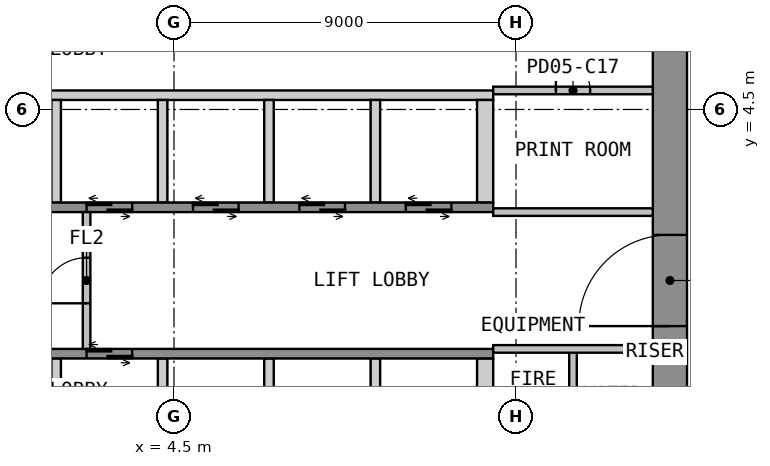
"""IFC4 building model, lengths in metres.
Left out: names, types, materials, properties, quantities, classifications, styles, units other than length and angle.
Written with IfcOpenShell. Run it as: python <this file> out.ifc"""

import sys

from ifc_helpers import new_model, si_unit, direction, frame, frame_2d, origin, place, context, subcontext, project, spatial, polyline, rectangle, outline, extrude, element, fill, save


model = new_model("IFC4")
c1 = context("Model", 3, precision=1e-05, world=origin(), true_north=direction((0.0, 1.0)))
c2 = subcontext(c1, "Body", "Model", "MODEL_VIEW")
j1 = project(units=[si_unit("LENGTHUNIT", "METRE"), si_unit("PLANEANGLEUNIT", "RADIAN")], contexts=[c1])
p1 = place(None, origin())
s1 = spatial("IfcSite", under=j1, at=p1, CompositionType="ELEMENT")
p2 = place(p1, origin())
s2 = spatial("IfcBuilding", under=s1, at=p2, CompositionType="ELEMENT")
p3 = place(p2, frame((0.0, 0.0, 25.2)))
s3 = spatial("IfcBuildingStorey", under=s2, at=p3, CompositionType="ELEMENT", Elevation=25.2)
p4 = place(p3, frame((17.55, -12.6, 0.0), z_axis=(0.0, 0.0, 1.0), x_axis=(0.0, 1.0, 0.0)))
e1 = element("IfcWall", 1, at=p4, inside=s3, PredefinedType="SHEAR", context=c2, shape_type="SweptSolid", body=[
    extrude(rectangle(XDim=25.2, YDim=0.9, at=frame_2d((12.6, 0.0))), origin(), (0.0, 0.0, 1.0), 4.425),
])
p5 = place(p4, frame((11.4, 0.0, 0.0)))
e2 = element("IfcOpeningElement", 2, at=p5, cuts=e1, PredefinedType="OPENING", context=c2, shape_type="SweptSolid", body=[
    extrude(rectangle(XDim=2.4, YDim=2.1, at=frame_2d((1.2, 1.05))), frame((0.0, 0.46, 0.0), z_axis=(0.0, -1.0, 0.0), x_axis=(1.0, 0.0, 0.0)), (0.0, 0.0, 1.0), 0.92),
])
p6 = place(p3, origin())
e3 = element("IfcWall", 3, at=p6, inside=s3, PredefinedType="SHEAR", context=c2, shape_type="SweptSolid", body=[
    extrude(outline(polyline([(-12.9, 4.75), (12.9, 4.75), (12.9, 5.0), (-12.9, 5.0), (-12.9, 4.75)])), origin(), (0.0, 0.0, 1.0), 4.425),
])
p7 = place(p3, origin())
e4 = element("IfcWall", 4, at=p7, inside=s3, PredefinedType="SHEAR", context=c2, shape_type="SweptSolid", body=[
    extrude(outline(polyline([(1.275, 2.05), (1.525, 2.05), (1.525, 4.75), (1.275, 4.75), (1.275, 2.05)])), origin(), (0.0, 0.0, 1.0), 4.425),
])
p8 = place(p3, origin())
e5 = element("IfcWall", 5, at=p8, inside=s3, PredefinedType="SHEAR", context=c2, shape_type="SweptSolid", body=[
    extrude(outline(polyline([(4.075, 2.05), (4.325, 2.05), (4.325, 4.75), (4.075, 4.75), (4.075, 2.05)])), origin(), (0.0, 0.0, 1.0), 4.425),
])
p9 = place(p3, origin())
e6 = element("IfcWall", 6, at=p9, inside=s3, PredefinedType="SHEAR", context=c2, shape_type="SweptSolid", body=[
    extrude(outline(polyline([(6.875, 2.05), (7.125, 2.05), (7.125, 4.75), (6.875, 4.75), (6.875, 2.05)])), origin(), (0.0, 0.0, 1.0), 4.425),
])
p10 = place(p3, origin())
e7 = element("IfcWall", 7, at=p10, inside=s3, PredefinedType="SHEAR", context=c2, shape_type="SweptSolid", body=[
    extrude(outline(polyline([(9.675, 2.05), (9.925, 2.05), (9.925, 4.75), (9.675, 4.75), (9.675, 2.05)])), origin(), (0.0, 0.0, 1.0), 4.425),
])
p11 = place(p3, origin())
e8 = element("IfcWall", 8, at=p11, inside=s3, PredefinedType="SHEAR", context=c2, shape_type="SweptSolid", body=[
    extrude(outline(polyline([(12.475, 2.05), (12.9, 2.05), (12.9, 4.75), (12.475, 4.75), (12.475, 2.05)])), origin(), (0.0, 0.0, 1.0), 4.425),
])
p12 = place(p3, frame((-12.9, 1.925, 0.0), z_axis=(0.0, 0.0, 1.0), x_axis=(1.0, 0.0, 0.0)))
e9 = element("IfcWall", 9, at=p12, inside=s3, PredefinedType="SHEAR", context=c2, shape_type="SweptSolid", body=[
    extrude(rectangle(XDim=25.8, YDim=0.25, at=frame_2d((12.9, 0.0))), origin(), (0.0, 0.0, 1.0), 4.425),
])
p13 = place(p12, frame((9.5, 0.0, 0.0)))
e10 = element("IfcOpeningElement", 10, at=p13, cuts=e9, PredefinedType="OPENING", context=c2, shape_type="SweptSolid", body=[
    extrude(rectangle(XDim=1.2, YDim=2.1, at=frame_2d((0.6, 1.05))), frame((0.0, 0.135, 0.0), z_axis=(0.0, -1.0, 0.0), x_axis=(1.0, 0.0, 0.0)), (0.0, 0.0, 1.0), 0.27),
])
p14 = place(p12, frame((12.3, 0.0, 0.0)))
e11 = element("IfcOpeningElement", 11, at=p14, cuts=e9, PredefinedType="OPENING", context=c2, shape_type="SweptSolid", body=[
    extrude(rectangle(XDim=1.2, YDim=2.1, at=frame_2d((0.6, 1.05))), frame((0.0, 0.135, 0.0), z_axis=(0.0, -1.0, 0.0), x_axis=(1.0, 0.0, 0.0)), (0.0, 0.0, 1.0), 0.27),
])
p15 = place(p12, frame((15.1, 0.0, 0.0)))
e12 = element("IfcOpeningElement", 12, at=p15, cuts=e9, PredefinedType="OPENING", context=c2, shape_type="SweptSolid", body=[
    extrude(rectangle(XDim=1.2, YDim=2.1, at=frame_2d((0.6, 1.05))), frame((0.0, 0.135, 0.0), z_axis=(0.0, -1.0, 0.0), x_axis=(1.0, 0.0, 0.0)), (0.0, 0.0, 1.0), 0.27),
])
p16 = place(p12, frame((17.9, 0.0, 0.0)))
e13 = element("IfcOpeningElement", 13, at=p16, cuts=e9, PredefinedType="OPENING", context=c2, shape_type="SweptSolid", body=[
    extrude(rectangle(XDim=1.2, YDim=2.1, at=frame_2d((0.6, 1.05))), frame((0.0, 0.135, 0.0), z_axis=(0.0, -1.0, 0.0), x_axis=(1.0, 0.0, 0.0)), (0.0, 0.0, 1.0), 0.27),
])
p17 = place(p12, frame((20.7, 0.0, 0.0)))
e14 = element("IfcOpeningElement", 14, at=p17, cuts=e9, PredefinedType="OPENING", context=c2, shape_type="SweptSolid", body=[
    extrude(rectangle(XDim=1.2, YDim=2.1, at=frame_2d((0.6, 1.05))), frame((0.0, 0.135, 0.0), z_axis=(0.0, -1.0, 0.0), x_axis=(1.0, 0.0, 0.0)), (0.0, 0.0, 1.0), 0.27),
])
p18 = place(p12, frame((23.5, 0.0, 0.0)))
e15 = element("IfcOpeningElement", 15, at=p18, cuts=e9, PredefinedType="OPENING", context=c2, shape_type="SweptSolid", body=[
    extrude(rectangle(XDim=1.2, YDim=2.1, at=frame_2d((0.6, 1.05))), frame((0.0, 0.135, 0.0), z_axis=(0.0, -1.0, 0.0), x_axis=(1.0, 0.0, 0.0)), (0.0, 0.0, 1.0), 0.27),
])
p19 = place(p3, origin())
e16 = element("IfcWall", 16, at=p19, inside=s3, PredefinedType="SHEAR", context=c2, shape_type="SweptSolid", body=[
    extrude(outline(polyline([(1.275, -4.75), (1.525, -4.75), (1.525, -2.05), (1.275, -2.05), (1.275, -4.75)])), origin(), (0.0, 0.0, 1.0), 4.425),
])
p20 = place(p3, origin())
e17 = element("IfcWall", 17, at=p20, inside=s3, PredefinedType="SHEAR", context=c2, shape_type="SweptSolid", body=[
    extrude(outline(polyline([(4.075, -4.75), (4.325, -4.75), (4.325, -2.05), (4.075, -2.05), (4.075, -4.75)])), origin(), (0.0, 0.0, 1.0), 4.425),
])
p21 = place(p3, origin())
e18 = element("IfcWall", 18, at=p21, inside=s3, PredefinedType="SHEAR", context=c2, shape_type="SweptSolid", body=[
    extrude(outline(polyline([(6.875, -4.75), (7.125, -4.75), (7.125, -2.05), (6.875, -2.05), (6.875, -4.75)])), origin(), (0.0, 0.0, 1.0), 4.425),
])
p22 = place(p3, origin())
e19 = element("IfcWall", 19, at=p22, inside=s3, PredefinedType="SHEAR", context=c2, shape_type="SweptSolid", body=[
    extrude(outline(polyline([(9.675, -4.75), (9.925, -4.75), (9.925, -2.05), (9.675, -2.05), (9.675, -4.75)])), origin(), (0.0, 0.0, 1.0), 4.425),
])
p23 = place(p3, origin())
e20 = element("IfcWall", 20, at=p23, inside=s3, PredefinedType="SHEAR", context=c2, shape_type="SweptSolid", body=[
    extrude(outline(polyline([(12.475, -4.75), (12.9, -4.75), (12.9, -2.05), (12.475, -2.05), (12.475, -4.75)])), origin(), (0.0, 0.0, 1.0), 4.425),
])
p24 = place(p3, frame((-12.9, -1.925, 0.0), z_axis=(0.0, 0.0, 1.0), x_axis=(1.0, 0.0, 0.0)))
e21 = element("IfcWall", 21, at=p24, inside=s3, PredefinedType="SHEAR", context=c2, shape_type="SweptSolid", body=[
    extrude(rectangle(XDim=25.8, YDim=0.25, at=frame_2d((12.9, 0.0))), origin(), (0.0, 0.0, 1.0), 4.425),
])
p25 = place(p24, frame((1.1, 0.0, 0.0)))
e22 = element("IfcOpeningElement", 22, at=p25, cuts=e21, PredefinedType="OPENING", context=c2, shape_type="SweptSolid", body=[
    extrude(rectangle(XDim=1.2, YDim=2.1, at=frame_2d((0.6, 1.05))), frame((0.0, 0.135, 0.0), z_axis=(0.0, -1.0, 0.0), x_axis=(1.0, 0.0, 0.0)), (0.0, 0.0, 1.0), 0.27),
])
p26 = place(p24, frame((3.9, 0.0, 0.0)))
e23 = element("IfcOpeningElement", 23, at=p26, cuts=e21, PredefinedType="OPENING", context=c2, shape_type="SweptSolid", body=[
    extrude(rectangle(XDim=1.2, YDim=2.1, at=frame_2d((0.6, 1.05))), frame((0.0, 0.135, 0.0), z_axis=(0.0, -1.0, 0.0), x_axis=(1.0, 0.0, 0.0)), (0.0, 0.0, 1.0), 0.27),
])
p27 = place(p24, frame((6.7, 0.0, 0.0)))
e24 = element("IfcOpeningElement", 24, at=p27, cuts=e21, PredefinedType="OPENING", context=c2, shape_type="SweptSolid", body=[
    extrude(rectangle(XDim=1.2, YDim=2.1, at=frame_2d((0.6, 1.05))), frame((0.0, 0.135, 0.0), z_axis=(0.0, -1.0, 0.0), x_axis=(1.0, 0.0, 0.0)), (0.0, 0.0, 1.0), 0.27),
])
p28 = place(p24, frame((9.5, 0.0, 0.0)))
e25 = element("IfcOpeningElement", 25, at=p28, cuts=e21, PredefinedType="OPENING", context=c2, shape_type="SweptSolid", body=[
    extrude(rectangle(XDim=1.2, YDim=2.1, at=frame_2d((0.6, 1.05))), frame((0.0, 0.135, 0.0), z_axis=(0.0, -1.0, 0.0), x_axis=(1.0, 0.0, 0.0)), (0.0, 0.0, 1.0), 0.27),
])
p29 = place(p24, frame((12.3, 0.0, 0.0)))
e26 = element("IfcOpeningElement", 26, at=p29, cuts=e21, PredefinedType="OPENING", context=c2, shape_type="SweptSolid", body=[
    extrude(rectangle(XDim=1.2, YDim=2.1, at=frame_2d((0.6, 1.05))), frame((0.0, 0.135, 0.0), z_axis=(0.0, -1.0, 0.0), x_axis=(1.0, 0.0, 0.0)), (0.0, 0.0, 1.0), 0.27),
])
p30 = place(p24, frame((15.1, 0.0, 0.0)))
e27 = element("IfcOpeningElement", 27, at=p30, cuts=e21, PredefinedType="OPENING", context=c2, shape_type="SweptSolid", body=[
    extrude(rectangle(XDim=1.2, YDim=2.1, at=frame_2d((0.6, 1.05))), frame((0.0, 0.135, 0.0), z_axis=(0.0, -1.0, 0.0), x_axis=(1.0, 0.0, 0.0)), (0.0, 0.0, 1.0), 0.27),
])
p31 = place(p3, frame((2.2, -1.8, 0.0), z_axis=(0.0, 0.0, 1.0), x_axis=(0.0, 1.0, 0.0)))
e28 = element("IfcWall", 28, at=p31, inside=s3, PredefinedType="PARTITIONING", context=c2, shape_type="SweptSolid", body=[
    extrude(rectangle(XDim=3.6, YDim=0.2, at=frame_2d((1.8, 0.0))), origin(), (0.0, 0.0, 1.0), 4.425),
])
p32 = place(p31, frame((1.2, 0.0, 0.0)))
e29 = element("IfcOpeningElement", 29, at=p32, cuts=e28, PredefinedType="OPENING", context=c2, shape_type="SweptSolid", body=[
    extrude(rectangle(XDim=1.2, YDim=2.1, at=frame_2d((0.6, 1.05))), frame((0.0, 0.11, 0.0), z_axis=(0.0, -1.0, 0.0), x_axis=(1.0, 0.0, 0.0)), (0.0, 0.0, 1.0), 0.22),
])
p33 = place(p3, frame((12.9, 5.0, 0.0), z_axis=(0.0, 0.0, 1.0), x_axis=(1.0, 0.0, 0.0)))
e30 = element("IfcWall", 30, at=p33, inside=s3, PredefinedType="PARTITIONING", context=c2, shape_type="SweptSolid", body=[
    extrude(rectangle(XDim=4.2, YDim=0.2, at=frame_2d((2.1, 0.0))), origin(), (0.0, 0.0, 1.0), 4.425),
])
p34 = place(p33, frame((1.65, 0.0, 0.0)))
e31 = element("IfcOpeningElement", 31, at=p34, cuts=e30, PredefinedType="OPENING", context=c2, shape_type="SweptSolid", body=[
    extrude(rectangle(XDim=0.9, YDim=2.1, at=frame_2d((0.45, 1.05))), frame((0.0, 0.11, 0.0), z_axis=(0.0, -1.0, 0.0), x_axis=(1.0, 0.0, 0.0)), (0.0, 0.0, 1.0), 0.22),
])
p35 = place(p3, frame((12.9, 1.8, 0.0), z_axis=(0.0, 0.0, 1.0), x_axis=(1.0, 0.0, 0.0)))
e32 = element("IfcWall", 32, at=p35, inside=s3, PredefinedType="PARTITIONING", context=c2, shape_type="SweptSolid", body=[
    extrude(rectangle(XDim=4.2, YDim=0.2, at=frame_2d((2.1, 0.0))), origin(), (0.0, 0.0, 1.0), 4.425),
])
p36 = place(p3, frame((15.0, -5.0, 0.0), z_axis=(0.0, 0.0, 1.0), x_axis=(0.0, 1.0, 0.0)))
e33 = element("IfcWall", 33, at=p36, inside=s3, PredefinedType="PARTITIONING", context=c2, shape_type="SweptSolid", body=[
    extrude(rectangle(XDim=3.2, YDim=0.2, at=frame_2d((1.6, 0.0))), origin(), (0.0, 0.0, 1.0), 4.425),
])
p37 = place(p3, frame((12.9, -1.8, 0.0), z_axis=(0.0, 0.0, 1.0), x_axis=(1.0, 0.0, 0.0)))
e34 = element("IfcWall", 34, at=p37, inside=s3, PredefinedType="PARTITIONING", context=c2, shape_type="SweptSolid", body=[
    extrude(rectangle(XDim=4.2, YDim=0.2, at=frame_2d((2.1, 0.0))), origin(), (0.0, 0.0, 1.0), 4.425),
])
p38 = place(p5, origin())
e35 = element("IfcDoor", 35, at=p38, inside=s3, OperationType="DOUBLE_DOOR_DOUBLE_SWING", PredefinedType="DOOR", context=c2, shape_type="SweptSolid", body=[
    extrude(rectangle(XDim=2.4, YDim=2.1, at=frame_2d((1.2, 1.05))), frame((0.0, 0.025, 0.0), z_axis=(0.0, -1.0, 0.0), x_axis=(1.0, 0.0, 0.0)), (0.0, 0.0, 1.0), 0.05),
])
fill(e2, e35)
p39 = place(p15, origin())
e36 = element("IfcDoor", 36, at=p39, inside=s3, OperationType="DOUBLE_DOOR_SLIDING", PredefinedType="DOOR", context=c2, shape_type="SweptSolid", body=[
    extrude(rectangle(XDim=1.2, YDim=2.1, at=frame_2d((0.6, 1.05))), frame((0.0, 0.025, 0.0), z_axis=(0.0, -1.0, 0.0), x_axis=(1.0, 0.0, 0.0)), (0.0, 0.0, 1.0), 0.05),
])
fill(e12, e36)
p40 = place(p16, origin())
e37 = element("IfcDoor", 37, at=p40, inside=s3, OperationType="DOUBLE_DOOR_SLIDING", PredefinedType="DOOR", context=c2, shape_type="SweptSolid", body=[
    extrude(rectangle(XDim=1.2, YDim=2.1, at=frame_2d((0.6, 1.05))), frame((0.0, 0.025, 0.0), z_axis=(0.0, -1.0, 0.0), x_axis=(1.0, 0.0, 0.0)), (0.0, 0.0, 1.0), 0.05),
])
fill(e13, e37)
p41 = place(p17, origin())
e38 = element("IfcDoor", 38, at=p41, inside=s3, OperationType="DOUBLE_DOOR_SLIDING", PredefinedType="DOOR", context=c2, shape_type="SweptSolid", body=[
    extrude(rectangle(XDim=1.2, YDim=2.1, at=frame_2d((0.6, 1.05))), frame((0.0, 0.025, 0.0), z_axis=(0.0, -1.0, 0.0), x_axis=(1.0, 0.0, 0.0)), (0.0, 0.0, 1.0), 0.05),
])
fill(e14, e38)
p42 = place(p18, origin())
e39 = element("IfcDoor", 39, at=p42, inside=s3, OperationType="DOUBLE_DOOR_SLIDING", PredefinedType="DOOR", context=c2, shape_type="SweptSolid", body=[
    extrude(rectangle(XDim=1.2, YDim=2.1, at=frame_2d((0.6, 1.05))), frame((0.0, 0.025, 0.0), z_axis=(0.0, -1.0, 0.0), x_axis=(1.0, 0.0, 0.0)), (0.0, 0.0, 1.0), 0.05),
])
fill(e15, e39)
p43 = place(p30, origin())
e40 = element("IfcDoor", 40, at=p43, inside=s3, OperationType="DOUBLE_DOOR_SLIDING", PredefinedType="DOOR", context=c2, shape_type="SweptSolid", body=[
    extrude(rectangle(XDim=1.2, YDim=2.1, at=frame_2d((0.6, 1.05))), frame((0.0, 0.025, 0.0), z_axis=(0.0, -1.0, 0.0), x_axis=(1.0, 0.0, 0.0)), (0.0, 0.0, 1.0), 0.05),
])
fill(e27, e40)
p44 = place(p32, origin())
e41 = element("IfcDoor", 41, at=p44, inside=s3, OperationType="SINGLE_SWING_LEFT", PredefinedType="DOOR", context=c2, shape_type="SweptSolid", body=[
    extrude(rectangle(XDim=1.2, YDim=2.1, at=frame_2d((0.6, 1.05))), frame((0.0, 0.025, 0.0), z_axis=(0.0, -1.0, 0.0), x_axis=(1.0, 0.0, 0.0)), (0.0, 0.0, 1.0), 0.05),
])
fill(e29, e41)
p45 = place(p34, origin())
e42 = element("IfcDoor", 42, at=p45, inside=s3, OperationType="SINGLE_SWING_LEFT", PredefinedType="DOOR", context=c2, shape_type="SweptSolid", body=[
    extrude(rectangle(XDim=0.9, YDim=2.1, at=frame_2d((0.45, 1.05))), frame((0.0, 0.025, 0.0), z_axis=(0.0, -1.0, 0.0), x_axis=(1.0, 0.0, 0.0)), (0.0, 0.0, 1.0), 0.05),
])
fill(e31, e42)
save(model, sys.argv[1])
